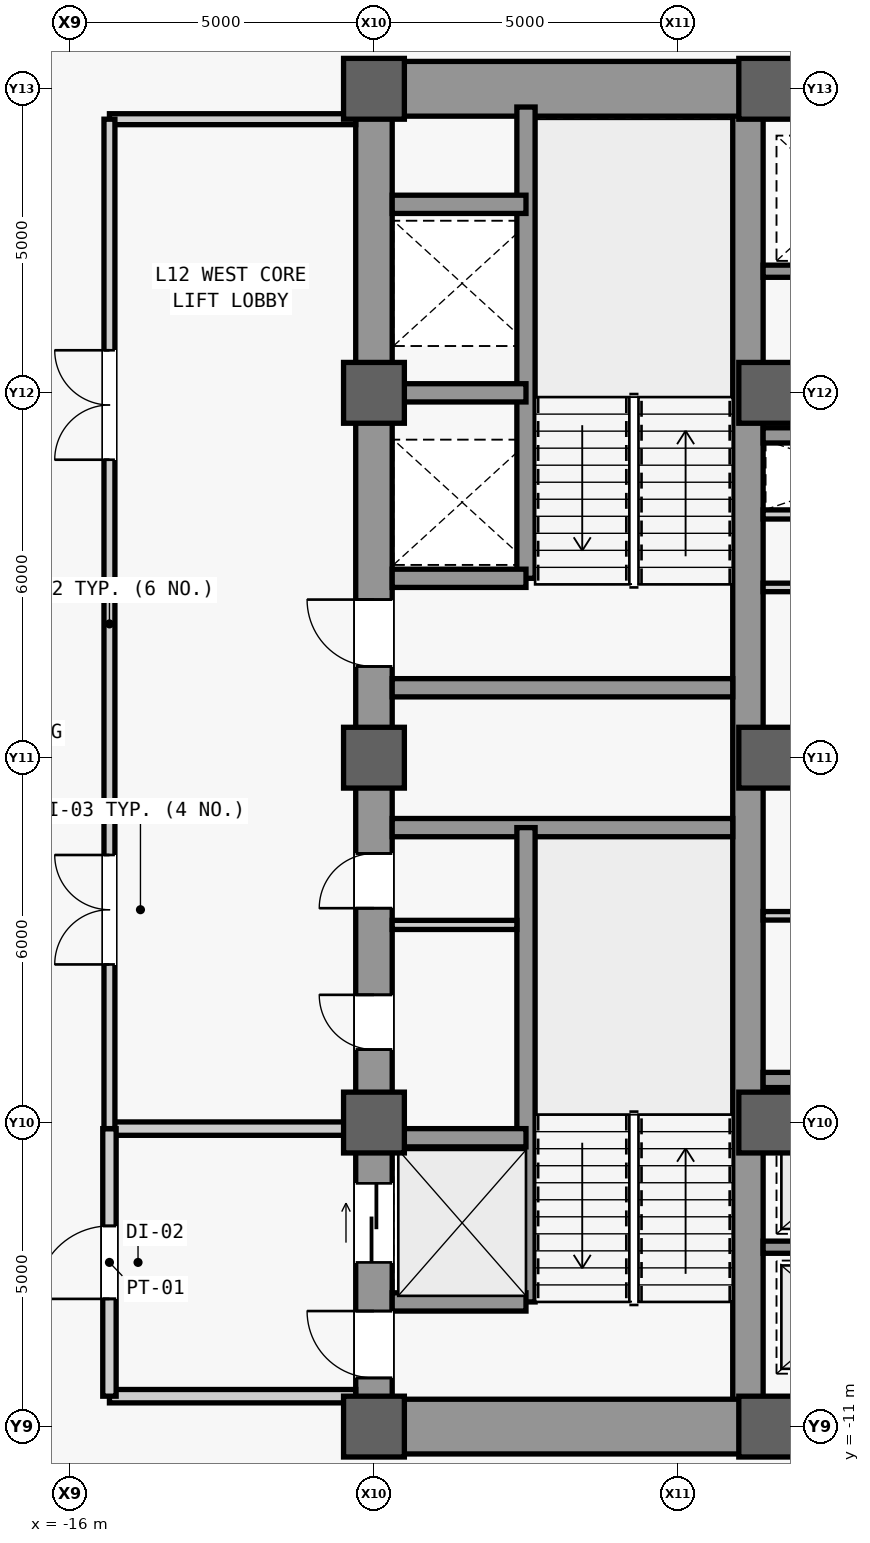
"""IFC4 building model, lengths in metres.
Left out: names, types, materials, properties, quantities, classifications, styles, units other than length and angle.
Written with IfcOpenShell. Run it as: python <this file> out.ifc"""

import sys

from ifc_helpers import new_model, si_unit, direction, frame, frame_2d, origin, origin_2d, place, context, subcontext, project, spatial, rectangle, extrude, source, transform, mapped, element, fill, save


model = new_model("IFC4")
c1 = context("Model", 3, precision=1e-05, world=origin(), true_north=direction((0.0, 1.0)))
c2 = subcontext(c1, "Body", "Model", "MODEL_VIEW")
j1 = project(units=[si_unit("LENGTHUNIT", "METRE"), si_unit("PLANEANGLEUNIT", "RADIAN")], contexts=[c1])
p1 = place(None, origin())
s1 = spatial("IfcSite", under=j1, at=p1, CompositionType="ELEMENT")
p2 = place(p1, origin())
s2 = spatial("IfcBuilding", under=s1, at=p2, CompositionType="ELEMENT")
p3 = place(p2, frame((0.0, 0.0, 57.8)))
s3 = spatial("IfcBuildingStorey", under=s2, at=p3, CompositionType="ELEMENT", Elevation=57.8)
m1 = source(origin(), c2, "Body", "SweptSolid", [
    extrude(rectangle(XDim=22.0, YDim=0.6, at=frame_2d((11.0, 0.0))), origin(), (0.0, 0.0, 1.0), 3.94),
])
p4 = place(p3, frame((-11.0, -11.0, 0.0), z_axis=(0.0, 0.0, 1.0), x_axis=(0.0, 1.0, 0.0)))
e1 = element("IfcWall", 1, at=p4, inside=s3, PredefinedType="SHEAR", context=c2, shape_type="MappedRepresentation", body=[
    mapped(m1, transform((0.0, 0.0, 0.0), scale=1.0)),
])
m2 = source(origin(), c2, "Body", "SweptSolid", [
    extrude(rectangle(XDim=1.1, YDim=2.2, at=frame_2d((0.55, 1.1))), frame((0.0, 0.31, 0.0), z_axis=(0.0, -1.0, 0.0), x_axis=(1.0, 0.0, 0.0)), (0.0, 0.0, 1.0), 0.62),
])
p5 = place(p4, frame((0.8, 0.0, 0.0)))
e2 = element("IfcOpeningElement", 2, at=p5, cuts=e1, PredefinedType="OPENING", context=c2, shape_type="MappedRepresentation", body=[
    mapped(m2, transform((0.0, 0.0, 0.0), scale=1.0)),
])
p6 = place(p4, frame((12.5, 0.0, 0.0)))
e3 = element("IfcOpeningElement", 3, at=p6, cuts=e1, PredefinedType="OPENING", context=c2, shape_type="MappedRepresentation", body=[
    mapped(m2, transform((0.0, 0.0, 0.0), scale=1.0)),
])
m3 = source(origin(), c2, "Body", "SweptSolid", [
    extrude(rectangle(XDim=0.9, YDim=2.15, at=frame_2d((0.45, 1.075))), frame((0.0, 0.31, 0.0), z_axis=(0.0, -1.0, 0.0), x_axis=(1.0, 0.0, 0.0)), (0.0, 0.0, 1.0), 0.62),
])
p7 = place(p4, frame((6.2, 0.0, 0.0)))
e4 = element("IfcOpeningElement", 4, at=p7, cuts=e1, PredefinedType="OPENING", context=c2, shape_type="MappedRepresentation", body=[
    mapped(m3, transform((0.0, 0.0, 0.0), scale=1.0)),
])
p8 = place(p4, frame((8.525, 0.0, 0.0)))
e5 = element("IfcOpeningElement", 5, at=p8, cuts=e1, PredefinedType="OPENING", context=c2, shape_type="MappedRepresentation", body=[
    mapped(m3, transform((0.0, 0.0, 0.0), scale=1.0)),
])
m4 = source(origin(), c2, "Body", "SweptSolid", [
    extrude(rectangle(XDim=1.3, YDim=2.3, at=frame_2d((0.65, 1.15))), frame((0.0, 0.31, 0.0), z_axis=(0.0, -1.0, 0.0), x_axis=(1.0, 0.0, 0.0)), (0.0, 0.0, 1.0), 0.62),
])
p9 = place(p4, frame((2.7, 0.0, 0.0)))
e6 = element("IfcOpeningElement", 6, at=p9, cuts=e1, PredefinedType="OPENING", context=c2, shape_type="MappedRepresentation", body=[
    mapped(m4, transform((0.0, 0.0, 0.0), scale=1.0)),
])
m5 = source(origin(), c2, "Body", "SweptSolid", [
    extrude(rectangle(XDim=21.4, YDim=0.5, at=frame_2d((10.7, 0.0))), origin(), (0.0, 0.0, 1.0), 3.94),
])
p10 = place(p3, frame((-4.85, -10.7, 0.0), z_axis=(0.0, 0.0, 1.0), x_axis=(0.0, 1.0, 0.0)))
e7 = element("IfcWall", 7, at=p10, inside=s3, PredefinedType="SHEAR", context=c2, shape_type="MappedRepresentation", body=[
    mapped(m5, transform((0.0, 0.0, 0.0), scale=1.0)),
])
m6 = source(origin(), c2, "Body", "SweptSolid", [
    extrude(rectangle(XDim=5.85, YDim=0.9, at=frame_2d((2.925, 0.0))), origin(), (0.0, 0.0, 1.0), 3.94),
])
for number, where, z_axis, x_axis in (
    (8, (-10.7, -11.0, 0.0), (0.0, 0.0, 1.0), (1.0, 0.0, 0.0)),
    (9, (-10.7, 11.0, 0.0), (0.0, 0.0, 1.0), (1.0, 0.0, 0.0)),
):
    element("IfcWall", number, at=place(p3, frame(where, z_axis=z_axis, x_axis=x_axis)), inside=s3, PredefinedType="SHEAR", context=c2, shape_type="MappedRepresentation", body=[
        mapped(m6, transform((0.0, 0.0, 0.0), scale=1.0)),
    ])
m7 = source(origin(), c2, "Body", "SweptSolid", [
    extrude(rectangle(XDim=5.6, YDim=0.3, at=frame_2d((2.8, 0.0))), origin(), (0.0, 0.0, 1.0), 3.94),
])
for number, where, z_axis, x_axis in (
    (10, (-10.7, -1.15, 0.0), (0.0, 0.0, 1.0), (1.0, 0.0, 0.0)),
    (11, (-10.7, 1.15, 0.0), (0.0, 0.0, 1.0), (1.0, 0.0, 0.0)),
):
    element("IfcWall", number, at=place(p3, frame(where, z_axis=z_axis, x_axis=x_axis)), inside=s3, PredefinedType="SHEAR", context=c2, shape_type="MappedRepresentation", body=[
        mapped(m7, transform((0.0, 0.0, 0.0), scale=1.0)),
    ])
m8 = source(origin(), c2, "Body", "SweptSolid", [
    extrude(rectangle(XDim=9.2, YDim=0.5, at=frame_2d((4.6, 0.0))), origin(), (0.0, 0.0, 1.0), 3.94),
])
p11 = place(p3, frame((-4.6, -11.0, 0.0), z_axis=(0.0, 0.0, 1.0), x_axis=(1.0, 0.0, 0.0)))
e12 = element("IfcWall", 12, at=p11, inside=s3, PredefinedType="SHEAR", context=c2, shape_type="MappedRepresentation", body=[
    mapped(m8, transform((0.0, 0.0, 0.0), scale=1.0)),
])
m9 = source(origin(), c2, "Body", "SweptSolid", [
    extrude(rectangle(XDim=1.8, YDim=2.25, at=frame_2d((0.9, 1.125))), frame((0.0, 0.26, 0.0), z_axis=(0.0, -1.0, 0.0), x_axis=(1.0, 0.0, 0.0)), (0.0, 0.0, 1.0), 0.52),
])
p12 = place(p11, frame((3.7, 0.0, 0.0)))
e13 = element("IfcOpeningElement", 13, at=p12, cuts=e12, PredefinedType="OPENING", context=c2, shape_type="MappedRepresentation", body=[
    mapped(m9, transform((0.0, 0.0, 0.0), scale=1.0)),
])
p13 = place(p3, frame((-4.6, 11.0, 0.0), z_axis=(0.0, 0.0, 1.0), x_axis=(1.0, 0.0, 0.0)))
e14 = element("IfcWall", 14, at=p13, inside=s3, PredefinedType="SHEAR", context=c2, shape_type="MappedRepresentation", body=[
    mapped(m8, transform((0.0, 0.0, 0.0), scale=1.0)),
])
p14 = place(p13, frame((3.7, 0.0, 0.0)))
e15 = element("IfcOpeningElement", 15, at=p14, cuts=e14, PredefinedType="OPENING", context=c2, shape_type="MappedRepresentation", body=[
    mapped(m9, transform((0.0, 0.0, 0.0), scale=1.0)),
])
m10 = source(origin(), c2, "Body", "SweptSolid", [
    extrude(rectangle(XDim=1.0, YDim=1.0, at=origin_2d()), origin(), (0.0, 0.0, 1.0), 4.2),
])
for number, where, z_axis, x_axis in (
    (16, (-11.0, -11.0, 0.0), (0.0, 0.0, 1.0), (1.0, 0.0, 0.0)),
    (17, (-11.0, -6.0, 0.0), (0.0, 0.0, 1.0), (1.0, 0.0, 0.0)),
    (18, (-11.0, 0.0, 0.0), (0.0, 0.0, 1.0), (1.0, 0.0, 0.0)),
    (19, (-11.0, 6.0, 0.0), (0.0, 0.0, 1.0), (1.0, 0.0, 0.0)),
    (20, (-11.0, 11.0, 0.0), (0.0, 0.0, 1.0), (1.0, 0.0, 0.0)),
    (21, (-4.5, -11.0, 0.0), (0.0, 0.0, 1.0), (1.0, 0.0, 0.0)),
    (22, (-4.5, -6.0, 0.0), (0.0, 0.0, 1.0), (1.0, 0.0, 0.0)),
    (23, (-4.5, 0.0, 0.0), (0.0, 0.0, 1.0), (1.0, 0.0, 0.0)),
    (24, (-4.5, 6.0, 0.0), (0.0, 0.0, 1.0), (1.0, 0.0, 0.0)),
    (25, (-4.5, 11.0, 0.0), (0.0, 0.0, 1.0), (1.0, 0.0, 0.0)),
):
    element("IfcColumn", number, at=place(p3, frame(where, z_axis=z_axis, x_axis=x_axis)), inside=s3, PredefinedType="COLUMN", context=c2, shape_type="MappedRepresentation", body=[
        mapped(m10, transform((0.0, 0.0, 0.0), scale=1.0)),
    ])
m11 = source(origin(), c2, "Body", "SweptSolid", [
    extrude(rectangle(XDim=7.8, YDim=0.3, at=frame_2d((3.9, 0.0))), origin(), (0.0, 0.0, 1.0), 3.94),
])
p15 = place(p3, frame((-8.5, -8.95, 0.0), z_axis=(0.0, 0.0, 1.0), x_axis=(0.0, 1.0, 0.0)))
e26 = element("IfcWall", 26, at=p15, inside=s3, PredefinedType="SHEAR", context=c2, shape_type="MappedRepresentation", body=[
    mapped(m11, transform((0.0, 0.0, 0.0), scale=1.0)),
])
m12 = source(origin(), c2, "Body", "SweptSolid", [
    extrude(rectangle(XDim=2.2, YDim=0.3, at=frame_2d((1.1, 0.0))), origin(), (0.0, 0.0, 1.0), 3.94),
])
for number, where, z_axis, x_axis in (
    (27, (-10.7, -8.95, 0.0), (0.0, 0.0, 1.0), (1.0, 0.0, 0.0)),
    (28, (-10.7, -6.25, 0.0), (0.0, 0.0, 1.0), (1.0, 0.0, 0.0)),
):
    element("IfcWall", number, at=place(p3, frame(where, z_axis=z_axis, x_axis=x_axis)), inside=s3, PredefinedType="SHEAR", context=c2, shape_type="MappedRepresentation", body=[
        mapped(m12, transform((0.0, 0.0, 0.0), scale=1.0)),
    ])
m13 = source(origin(), c2, "Body", "SweptSolid", [
    extrude(rectangle(XDim=7.75, YDim=0.3, at=frame_2d((3.875, 0.0))), origin(), (0.0, 0.0, 1.0), 3.94),
])
p16 = place(p3, frame((-8.5, 2.95, 0.0), z_axis=(0.0, 0.0, 1.0), x_axis=(0.0, 1.0, 0.0)))
e29 = element("IfcWall", 29, at=p16, inside=s3, PredefinedType="SHEAR", context=c2, shape_type="MappedRepresentation", body=[
    mapped(m13, transform((0.0, 0.0, 0.0), scale=1.0)),
])
for number, where, z_axis, x_axis in (
    (30, (-10.7, 2.95, 0.0), (0.0, 0.0, 1.0), (1.0, 0.0, 0.0)),
    (31, (-10.7, 6.0, 0.0), (0.0, 0.0, 1.0), (1.0, 0.0, 0.0)),
    (32, (-10.7, 9.1, 0.0), (0.0, 0.0, 1.0), (1.0, 0.0, 0.0)),
):
    element("IfcWall", number, at=place(p3, frame(where, z_axis=z_axis, x_axis=x_axis)), inside=s3, PredefinedType="SHEAR", context=c2, shape_type="MappedRepresentation", body=[
        mapped(m12, transform((0.0, 0.0, 0.0), scale=1.0)),
    ])
m14 = source(origin(), c2, "Body", "SweptSolid", [
    extrude(rectangle(XDim=2.05, YDim=0.15, at=frame_2d((1.025, 0.0))), origin(), (0.0, 0.0, 1.0), 3.94),
])
p17 = place(p3, frame((-10.7, -2.75, 0.0), z_axis=(0.0, 0.0, 1.0), x_axis=(1.0, 0.0, 0.0)))
e33 = element("IfcWall", 33, at=p17, inside=s3, PredefinedType="PARTITIONING", context=c2, shape_type="MappedRepresentation", body=[
    mapped(m14, transform((0.0, 0.0, 0.0), scale=1.0)),
])
m15 = source(origin(), c2, "Body", "SweptSolid", [
    extrude(rectangle(XDim=4.05, YDim=0.22, at=frame_2d((2.025, 0.0))), origin(), (0.0, 0.0, 1.0), 3.94),
])
p18 = place(p3, frame((-15.35, -10.5, 0.0), z_axis=(0.0, 0.0, 1.0), x_axis=(1.0, 0.0, 0.0)))
e34 = element("IfcWall", 34, at=p18, inside=s3, PredefinedType="PARTITIONING", context=c2, shape_type="MappedRepresentation", body=[
    mapped(m15, transform((0.0, 0.0, 0.0), scale=1.0)),
])
m16 = source(origin(), c2, "Body", "SweptSolid", [
    extrude(rectangle(XDim=4.05, YDim=0.22, at=frame_2d((2.025, 0.0))), origin(), (0.0, 0.0, 1.0), 3.085),
])
p19 = place(p3, frame((-15.35, -6.1, 0.0), z_axis=(0.0, 0.0, 1.0), x_axis=(1.0, 0.0, 0.0)))
e35 = element("IfcWall", 35, at=p19, inside=s3, PredefinedType="PARTITIONING", context=c2, shape_type="MappedRepresentation", body=[
    mapped(m16, transform((0.0, 0.0, 0.0), scale=1.0)),
])
m17 = source(origin(), c2, "Body", "SweptSolid", [
    extrude(rectangle(XDim=4.4, YDim=0.22, at=frame_2d((2.2, 0.0))), origin(), (0.0, 0.0, 1.0), 3.94),
])
p20 = place(p3, frame((-15.35, -10.5, 0.0), z_axis=(0.0, 0.0, 1.0), x_axis=(0.0, 1.0, 0.0)))
e36 = element("IfcWall", 36, at=p20, inside=s3, PredefinedType="PARTITIONING", context=c2, shape_type="MappedRepresentation", body=[
    mapped(m17, transform((0.0, 0.0, 0.0), scale=1.0)),
])
m18 = source(origin(), c2, "Body", "SweptSolid", [
    extrude(rectangle(XDim=1.2, YDim=2.2, at=frame_2d((0.6, 1.1))), frame((0.0, 0.12, 0.0), z_axis=(0.0, -1.0, 0.0), x_axis=(1.0, 0.0, 0.0)), (0.0, 0.0, 1.0), 0.24),
])
p21 = place(p20, frame((1.6, 0.0, 0.0)))
e37 = element("IfcOpeningElement", 37, at=p21, cuts=e36, PredefinedType="OPENING", context=c2, shape_type="MappedRepresentation", body=[
    mapped(m18, transform((0.0, 0.0, 0.0), scale=1.0)),
])
m19 = source(origin(), c2, "Body", "SweptSolid", [
    extrude(rectangle(XDim=4.05, YDim=0.18, at=frame_2d((2.025, 0.0))), origin(), (0.0, 0.0, 1.0), 3.94),
])
p22 = place(p3, frame((-15.35, 10.5, 0.0), z_axis=(0.0, 0.0, 1.0), x_axis=(1.0, 0.0, 0.0)))
e38 = element("IfcWall", 38, at=p22, inside=s3, PredefinedType="PARTITIONING", context=c2, shape_type="MappedRepresentation", body=[
    mapped(m19, transform((0.0, 0.0, 0.0), scale=1.0)),
])
m20 = source(origin(), c2, "Body", "SweptSolid", [
    extrude(rectangle(XDim=16.6, YDim=0.18, at=frame_2d((8.3, 0.0))), origin(), (0.0, 0.0, 1.0), 3.94),
])
p23 = place(p3, frame((-15.35, -6.1, 0.0), z_axis=(0.0, 0.0, 1.0), x_axis=(0.0, 1.0, 0.0)))
e39 = element("IfcWall", 39, at=p23, inside=s3, PredefinedType="PARTITIONING", context=c2, shape_type="MappedRepresentation", body=[
    mapped(m20, transform((0.0, 0.0, 0.0), scale=1.0)),
])
m21 = source(origin(), c2, "Body", "SweptSolid", [
    extrude(rectangle(XDim=1.8, YDim=2.25, at=frame_2d((0.9, 1.125))), frame((0.0, 0.1, 0.0), z_axis=(0.0, -1.0, 0.0), x_axis=(1.0, 0.0, 0.0)), (0.0, 0.0, 1.0), 0.2),
])
p24 = place(p23, frame((2.7, 0.0, 0.0)))
e40 = element("IfcOpeningElement", 40, at=p24, cuts=e39, PredefinedType="OPENING", context=c2, shape_type="MappedRepresentation", body=[
    mapped(m21, transform((0.0, 0.0, 0.0), scale=1.0)),
])
p25 = place(p23, frame((11.0, 0.0, 0.0)))
e41 = element("IfcOpeningElement", 41, at=p25, cuts=e39, PredefinedType="OPENING", context=c2, shape_type="MappedRepresentation", body=[
    mapped(m21, transform((0.0, 0.0, 0.0), scale=1.0)),
])
m22 = source(origin(), c2, "Body", "SweptSolid", [
    extrude(rectangle(XDim=3.45, YDim=0.15, at=frame_2d((1.725, 0.0))), origin(), (0.0, 0.0, 1.0), 3.94),
])
p26 = place(p3, frame((-4.6, 4.0, 0.0), z_axis=(0.0, 0.0, 1.0), x_axis=(1.0, 0.0, 0.0)))
e42 = element("IfcWall", 42, at=p26, inside=s3, PredefinedType="PARTITIONING", context=c2, shape_type="MappedRepresentation", body=[
    mapped(m22, transform((0.0, 0.0, 0.0), scale=1.0)),
])
m23 = source(origin(), c2, "Body", "SweptSolid", [
    extrude(rectangle(XDim=2.45, YDim=0.2, at=frame_2d((1.225, 0.0))), origin(), (0.0, 0.0, 1.0), 3.94),
])
p27 = place(p3, frame((-4.6, -8.05, 0.0), z_axis=(0.0, 0.0, 1.0), x_axis=(1.0, 0.0, 0.0)))
e43 = element("IfcWall", 43, at=p27, inside=s3, PredefinedType="SHEAR", context=c2, shape_type="MappedRepresentation", body=[
    mapped(m23, transform((0.0, 0.0, 0.0), scale=1.0)),
])
m24 = source(origin(), c2, "Body", "SweptSolid", [
    extrude(rectangle(XDim=9.2, YDim=0.25, at=frame_2d((4.6, 0.0))), origin(), (0.0, 0.0, 1.0), 3.94),
])
p28 = place(p3, frame((-4.6, -5.3, 0.0), z_axis=(0.0, 0.0, 1.0), x_axis=(1.0, 0.0, 0.0)))
e44 = element("IfcWall", 44, at=p28, inside=s3, PredefinedType="SHEAR", context=c2, shape_type="MappedRepresentation", body=[
    mapped(m24, transform((0.0, 0.0, 0.0), scale=1.0)),
])
m25 = source(origin(), c2, "Body", "SweptSolid", [
    extrude(rectangle(XDim=1.05, YDim=2.2, at=frame_2d((0.525, 1.1))), frame((0.0, 0.135, 0.0), z_axis=(0.0, -1.0, 0.0), x_axis=(1.0, 0.0, 0.0)), (0.0, 0.0, 1.0), 0.27),
])
p29 = place(p28, frame((4.075, 0.0, 0.0)))
e45 = element("IfcOpeningElement", 45, at=p29, cuts=e44, PredefinedType="OPENING", context=c2, shape_type="MappedRepresentation", body=[
    mapped(m25, transform((0.0, 0.0, 0.0), scale=1.0)),
])
p30 = place(p3, frame((-4.6, 8.0, 0.0), z_axis=(0.0, 0.0, 1.0), x_axis=(1.0, 0.0, 0.0)))
e46 = element("IfcWall", 46, at=p30, inside=s3, PredefinedType="SHEAR", context=c2, shape_type="MappedRepresentation", body=[
    mapped(m23, transform((0.0, 0.0, 0.0), scale=1.0)),
])
p31 = place(p3, frame((-4.6, 5.3, 0.0), z_axis=(0.0, 0.0, 1.0), x_axis=(1.0, 0.0, 0.0)))
e47 = element("IfcWall", 47, at=p31, inside=s3, PredefinedType="SHEAR", context=c2, shape_type="MappedRepresentation", body=[
    mapped(m24, transform((0.0, 0.0, 0.0), scale=1.0)),
])
p32 = place(p31, frame((4.075, 0.0, 0.0)))
e48 = element("IfcOpeningElement", 48, at=p32, cuts=e47, PredefinedType="OPENING", context=c2, shape_type="MappedRepresentation", body=[
    mapped(m25, transform((0.0, 0.0, 0.0), scale=1.0)),
])
m26 = source(origin(), c2, "Body", "SweptSolid", [
    extrude(rectangle(XDim=3.45, YDim=0.14, at=frame_2d((1.725, 0.0))), origin(), (0.0, 0.0, 1.0), 3.94),
])
p33 = place(p3, frame((-4.6, -2.6, 0.0), z_axis=(0.0, 0.0, 1.0), x_axis=(1.0, 0.0, 0.0)))
e49 = element("IfcWall", 49, at=p33, inside=s3, PredefinedType="PARTITIONING", context=c2, shape_type="MappedRepresentation", body=[
    mapped(m26, transform((0.0, 0.0, 0.0), scale=1.0)),
])
m27 = source(origin(), c2, "Body", "SweptSolid", [
    extrude(rectangle(XDim=3.45, YDim=0.14, at=frame_2d((1.725, 0.0))), origin(), (0.0, 0.0, 1.0), 3.245),
])
p34 = place(p3, frame((-4.6, 0.2, 0.0), z_axis=(0.0, 0.0, 1.0), x_axis=(1.0, 0.0, 0.0)))
e50 = element("IfcWall", 50, at=p34, inside=s3, PredefinedType="PARTITIONING", context=c2, shape_type="MappedRepresentation", body=[
    mapped(m27, transform((0.0, 0.0, 0.0), scale=1.0)),
])
p35 = place(p3, frame((-4.6, 2.8, 0.0), z_axis=(0.0, 0.0, 1.0), x_axis=(1.0, 0.0, 0.0)))
e51 = element("IfcWall", 51, at=p35, inside=s3, PredefinedType="PARTITIONING", context=c2, shape_type="MappedRepresentation", body=[
    mapped(m26, transform((0.0, 0.0, 0.0), scale=1.0)),
])
m28 = source(origin(), c2, "Body", "SweptSolid", [
    extrude(rectangle(XDim=1.1, YDim=2.2, at=frame_2d((0.55, 1.1))), frame((0.0, 0.025, 0.0), z_axis=(0.0, -1.0, 0.0), x_axis=(1.0, 0.0, 0.0)), (0.0, 0.0, 1.0), 0.05),
])
p36 = place(p5, origin())
e52 = element("IfcDoor", 52, at=p36, inside=s3, OperationType="SINGLE_SWING_RIGHT", PredefinedType="DOOR", context=c2, shape_type="MappedRepresentation", body=[
    mapped(m28, transform((0.0, 0.0, 0.0), scale=1.0)),
])
fill(e2, e52)
p37 = place(p6, origin())
e53 = element("IfcDoor", 53, at=p37, inside=s3, OperationType="SINGLE_SWING_RIGHT", PredefinedType="DOOR", context=c2, shape_type="MappedRepresentation", body=[
    mapped(m28, transform((0.0, 0.0, 0.0), scale=1.0)),
])
fill(e3, e53)
m29 = source(origin(), c2, "Body", "SweptSolid", [
    extrude(rectangle(XDim=0.9, YDim=2.15, at=frame_2d((0.45, 1.075))), frame((0.0, 0.025, 0.0), z_axis=(0.0, -1.0, 0.0), x_axis=(1.0, 0.0, 0.0)), (0.0, 0.0, 1.0), 0.05),
])
p38 = place(p7, origin())
e54 = element("IfcDoor", 54, at=p38, inside=s3, OperationType="SINGLE_SWING_RIGHT", PredefinedType="DOOR", context=c2, shape_type="MappedRepresentation", body=[
    mapped(m29, transform((0.0, 0.0, 0.0), scale=1.0)),
])
fill(e4, e54)
p39 = place(p8, origin())
e55 = element("IfcDoor", 55, at=p39, inside=s3, OperationType="SINGLE_SWING_LEFT", PredefinedType="DOOR", context=c2, shape_type="MappedRepresentation", body=[
    mapped(m29, transform((0.0, 0.0, 0.0), scale=1.0)),
])
fill(e5, e55)
m30 = source(origin(), c2, "Body", "SweptSolid", [
    extrude(rectangle(XDim=1.2, YDim=2.2, at=frame_2d((0.6, 1.1))), frame((0.0, 0.025, 0.0), z_axis=(0.0, -1.0, 0.0), x_axis=(1.0, 0.0, 0.0)), (0.0, 0.0, 1.0), 0.05),
])
p40 = place(p21, origin())
e56 = element("IfcDoor", 56, at=p40, inside=s3, OperationType="SINGLE_SWING_LEFT", PredefinedType="DOOR", context=c2, shape_type="MappedRepresentation", body=[
    mapped(m30, transform((0.0, 0.0, 0.0), scale=1.0)),
])
fill(e37, e56)
m31 = source(origin(), c2, "Body", "SweptSolid", [
    extrude(rectangle(XDim=1.8, YDim=2.25, at=frame_2d((0.9, 1.125))), frame((0.0, 0.025, 0.0), z_axis=(0.0, -1.0, 0.0), x_axis=(1.0, 0.0, 0.0)), (0.0, 0.0, 1.0), 0.05),
])
p41 = place(p24, origin())
e57 = element("IfcDoor", 57, at=p41, inside=s3, OperationType="SINGLE_SWING_LEFT", PredefinedType="DOOR", context=c2, shape_type="MappedRepresentation", body=[
    mapped(m31, transform((0.0, 0.0, 0.0), scale=1.0)),
])
fill(e40, e57)
p42 = place(p25, origin())
e58 = element("IfcDoor", 58, at=p42, inside=s3, OperationType="SINGLE_SWING_RIGHT", PredefinedType="DOOR", context=c2, shape_type="MappedRepresentation", body=[
    mapped(m31, transform((0.0, 0.0, 0.0), scale=1.0)),
])
fill(e41, e58)
m32 = source(origin(), c2, "Body", "SweptSolid", [
    extrude(rectangle(XDim=1.3, YDim=2.3, at=frame_2d((0.65, 1.15))), frame((0.0, 0.025, 0.0), z_axis=(0.0, -1.0, 0.0), x_axis=(1.0, 0.0, 0.0)), (0.0, 0.0, 1.0), 0.05),
])
p43 = place(p9, origin())
e59 = element("IfcDoor", 59, at=p43, inside=s3, OperationType="SLIDING_TO_LEFT", PredefinedType="DOOR", context=c2, shape_type="MappedRepresentation", body=[
    mapped(m32, transform((0.0, 0.0, 0.0), scale=1.0)),
])
fill(e6, e59)
save(model, sys.argv[1])
